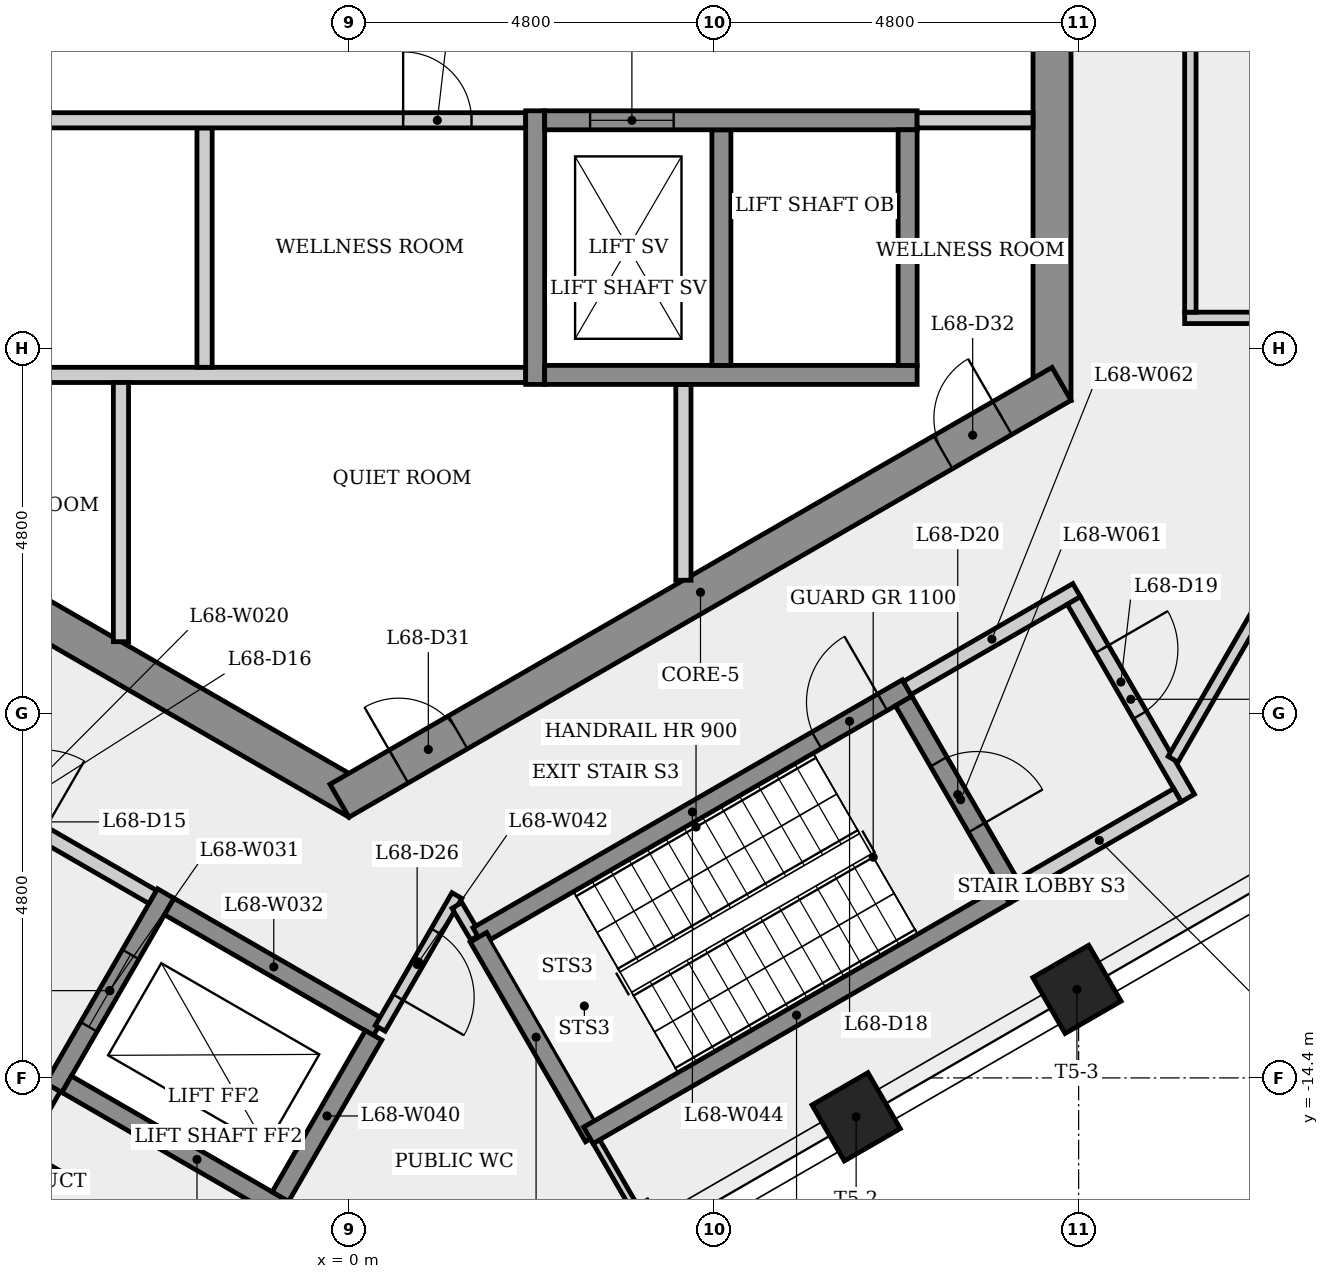
"""IFC4 building model, lengths in metres.
Left out: names, types, materials, properties, quantities, classifications, styles, units other than length and angle.
Written with IfcOpenShell. Run it as: python <this file> out.ifc"""

import sys

from ifc_helpers import new_model, si_unit, direction, frame, frame_2d, origin, origin_2d, place, context, subcontext, project, spatial, rectangle, extrude, element, fill, save


model = new_model("IFC4")
c1 = context("Model", 3, precision=1e-05, world=origin(), true_north=direction((0.0, 1.0)))
c2 = subcontext(c1, "Body", "Model", "MODEL_VIEW")
j1 = project(units=[si_unit("LENGTHUNIT", "METRE"), si_unit("PLANEANGLEUNIT", "RADIAN")], contexts=[c1])
p1 = place(None, origin())
s1 = spatial("IfcSite", under=j1, at=p1, CompositionType="ELEMENT")
p2 = place(p1, origin())
s2 = spatial("IfcBuilding", under=s1, at=p2, CompositionType="ELEMENT")
p3 = place(p2, frame((0.0, 0.0, 252.9)))
s3 = spatial("IfcBuildingStorey", under=s2, at=p3, CompositionType="ELEMENT", Elevation=252.9)
p4 = place(p3, frame((9.25, -5.485, 0.0), z_axis=(0.0, 0.0, 1.0), x_axis=(0.0, 1.0, 0.0)))
e1 = element("IfcWall", 1, at=p4, inside=s3, PredefinedType="SHEAR", context=c2, shape_type="SweptSolid", body=[
    extrude(rectangle(XDim=10.97, YDim=0.5, at=frame_2d((5.485, 0.0))), origin(), (0.0, 0.0, 1.0), 5.0),
])
p5 = place(p4, frame((4.685, 0.0, 0.0)))
e2 = element("IfcOpeningElement", 2, at=p5, cuts=e1, PredefinedType="OPENING", context=c2, shape_type="SweptSolid", body=[
    extrude(rectangle(XDim=1.6, YDim=2.1, at=frame_2d((0.8, 1.05))), frame((0.0, 0.26, 0.0), z_axis=(0.0, -1.0, 0.0), x_axis=(1.0, 0.0, 0.0)), (0.0, 0.0, 1.0), 0.52),
])
p6 = place(p3, frame((-9.375, -5.268, 0.0), z_axis=(0.0, 0.0, 1.0), x_axis=(0.866023993627, -0.500002442456, 0.0)))
e3 = element("IfcWall", 3, at=p6, inside=s3, PredefinedType="SHEAR", context=c2, shape_type="SweptSolid", body=[
    extrude(rectangle(XDim=10.97, YDim=0.5, at=frame_2d((5.485, 0.0))), origin(), (0.0, 0.0, 1.0), 5.0),
])
p7 = place(p6, frame((3.303, 0.0, 0.0)))
e4 = element("IfcOpeningElement", 4, at=p7, cuts=e3, PredefinedType="OPENING", context=c2, shape_type="SweptSolid", body=[
    extrude(rectangle(XDim=0.9, YDim=2.1, at=frame_2d((0.45, 1.05))), frame((0.0, 0.26, 0.0), z_axis=(0.0, -1.0, 0.0), x_axis=(1.0, 0.0, 0.0)), (0.0, 0.0, 1.0), 0.52),
])
p8 = place(p3, frame((-0.125, -10.753, 0.0), z_axis=(0.0, 0.0, 1.0), x_axis=(0.866023993627, 0.500002442456, 0.0)))
e5 = element("IfcWall", 5, at=p8, inside=s3, PredefinedType="SHEAR", context=c2, shape_type="SweptSolid", body=[
    extrude(rectangle(XDim=10.97, YDim=0.5, at=frame_2d((5.485, 0.0))), origin(), (0.0, 0.0, 1.0), 5.0),
])
p9 = place(p8, frame((0.9, 0.0, 0.0)))
e6 = element("IfcOpeningElement", 6, at=p9, cuts=e5, PredefinedType="OPENING", context=c2, shape_type="SweptSolid", body=[
    extrude(rectangle(XDim=0.9, YDim=2.1, at=frame_2d((0.45, 1.05))), frame((0.0, 0.26, 0.0), z_axis=(0.0, -1.0, 0.0), x_axis=(1.0, 0.0, 0.0)), (0.0, 0.0, 1.0), 0.52),
])
p10 = place(p8, frame((9.17, 0.0, 0.0)))
e7 = element("IfcOpeningElement", 7, at=p10, cuts=e5, PredefinedType="OPENING", context=c2, shape_type="SweptSolid", body=[
    extrude(rectangle(XDim=0.9, YDim=2.1, at=frame_2d((0.45, 1.05))), frame((0.0, 0.26, 0.0), z_axis=(0.0, -1.0, 0.0), x_axis=(1.0, 0.0, 0.0)), (0.0, 0.0, 1.0), 0.52),
])
for number, where, z_axis, x_axis in (
    (8, (6.673, -14.912, 0.0), (0.0, 0.0, 1.0), (0.5, -0.866, 0.0)),
    (9, (9.578, -13.235, 0.0), (0.0, 0.0, 1.0), (0.5, -0.866, 0.0)),
):
    element("IfcColumn", number, at=place(p3, frame(where, z_axis=z_axis, x_axis=x_axis)), inside=s3, PredefinedType="COLUMN", context=c2, shape_type="SweptSolid", body=[
        extrude(rectangle(XDim=0.85, YDim=0.85, at=origin_2d()), origin(), (0.0, 0.0, 1.0), 5.0),
    ])
p11 = place(p3, frame((-9.0, -5.15, 0.0), z_axis=(0.0, 0.0, 1.0), x_axis=(1.0, 0.0, 0.0)))
e10 = element("IfcWall", 10, at=p11, inside=s3, PredefinedType="PARTITIONING", context=c2, shape_type="SweptSolid", body=[
    extrude(rectangle(XDim=11.325, YDim=0.2, at=frame_2d((5.663, 0.0))), origin(), (0.0, 0.0, 1.0), 4.6),
])
p12 = place(p3, frame((-6.435, -9.795, 0.0), z_axis=(0.0, 0.0, 1.0), x_axis=(0.866012907634, -0.500021643343, 0.0)))
e11 = element("IfcWall", 11, at=p12, inside=s3, PredefinedType="PARTITIONING", context=c2, shape_type="SweptSolid", body=[
    extrude(rectangle(XDim=4.45, YDim=0.2, at=frame_2d((2.225, 0.0))), origin(), (0.0, 0.0, 1.0), 4.6),
])
p13 = place(p12, frame((1.675, 0.0, 0.0)))
e12 = element("IfcOpeningElement", 12, at=p13, cuts=e11, PredefinedType="OPENING", context=c2, shape_type="SweptSolid", body=[
    extrude(rectangle(XDim=1.1, YDim=2.1, at=frame_2d((0.55, 1.05))), frame((0.0, 0.11, 0.0), z_axis=(0.0, -1.0, 0.0), x_axis=(1.0, 0.0, 0.0)), (0.0, 0.0, 1.0), 0.22),
])
p14 = place(p3, frame((-4.387, -15.399, 0.0), z_axis=(0.0, 0.0, 1.0), x_axis=(0.865955154139, -0.50012165622, 0.0)))
e13 = element("IfcWall", 13, at=p14, inside=s3, PredefinedType="PLUMBINGWALL", context=c2, shape_type="SweptSolid", body=[
    extrude(rectangle(XDim=0.6, YDim=0.2, at=frame_2d((0.3, 0.0))), origin(), (0.0, 0.0, 1.0), 4.6),
])
p15 = place(p3, frame((-3.885, -14.529, 0.0), z_axis=(0.0, 0.0, 1.0), x_axis=(-0.49998975084, -0.866031321059, 0.0)))
e14 = element("IfcWall", 14, at=p15, inside=s3, PredefinedType="PARTITIONING", context=c2, shape_type="SweptSolid", body=[
    extrude(rectangle(XDim=0.975, YDim=0.2, at=frame_2d((0.488, 0.0))), origin(), (0.0, 0.0, 1.0), 4.6),
])
p16 = place(p3, frame((-3.0, -5.25, 0.0), z_axis=(0.0, 0.0, 1.0), x_axis=(0.0, -1.0, 0.0)))
e15 = element("IfcWall", 15, at=p16, inside=s3, PredefinedType="PARTITIONING", context=c2, shape_type="SweptSolid", body=[
    extrude(rectangle(XDim=3.41, YDim=0.2, at=frame_2d((1.705, 0.0))), origin(), (0.0, 0.0, 1.0), 4.6),
])
p17 = place(p3, frame((-2.41, -11.974, 0.0), z_axis=(0.0, 0.0, 1.0), x_axis=(-0.500001826776, -0.866024349092, 0.0)))
e16 = element("IfcWall", 16, at=p17, inside=s3, PredefinedType="SHEAR", context=c2, shape_type="SweptSolid", body=[
    extrude(rectangle(XDim=2.95, YDim=0.25, at=frame_2d((1.475, 0.0))), origin(), (0.0, 0.0, 1.0), 4.6),
])
p18 = place(p17, frame((0.925, 0.0, 0.0)))
e17 = element("IfcOpeningElement", 17, at=p18, cuts=e16, PredefinedType="OPENING", context=c2, shape_type="SweptSolid", body=[
    extrude(rectangle(XDim=1.1, YDim=2.1, at=frame_2d((0.55, 1.05))), frame((0.0, 0.135, 0.0), z_axis=(0.0, -1.0, 0.0), x_axis=(1.0, 0.0, 0.0)), (0.0, 0.0, 1.0), 0.27),
])
p19 = place(p3, frame((-2.364, -12.145, 0.0), z_axis=(0.0, 0.0, 1.0), x_axis=(0.866048579423, -0.499959856469, 0.0)))
e18 = element("IfcWall", 18, at=p19, inside=s3, PredefinedType="SHEAR", context=c2, shape_type="SweptSolid", body=[
    extrude(rectangle(XDim=3.175, YDim=0.25, at=frame_2d((1.587, 0.0))), origin(), (0.0, 0.0, 1.0), 5.0),
])
p20 = place(p3, frame((-1.9, -1.9, 0.0), z_axis=(0.0, 0.0, 1.0), x_axis=(0.0, -1.0, 0.0)))
e19 = element("IfcWall", 19, at=p20, inside=s3, PredefinedType="PARTITIONING", context=c2, shape_type="SweptSolid", body=[
    extrude(rectangle(XDim=3.15, YDim=0.2, at=frame_2d((1.575, 0.0))), origin(), (0.0, 0.0, 1.0), 4.6),
])
p21 = place(p3, frame((-9.0, -1.8, 0.0), z_axis=(0.0, 0.0, 1.0), x_axis=(1.0, 0.0, 0.0)))
e20 = element("IfcWall", 20, at=p21, inside=s3, PredefinedType="PARTITIONING", context=c2, shape_type="SweptSolid", body=[
    extrude(rectangle(XDim=11.325, YDim=0.2, at=frame_2d((5.663, 0.0))), origin(), (0.0, 0.0, 1.0), 4.6),
])
p22 = place(p21, frame((3.085, 0.0, 0.0)))
e21 = element("IfcOpeningElement", 21, at=p22, cuts=e20, PredefinedType="OPENING", context=c2, shape_type="SweptSolid", body=[
    extrude(rectangle(XDim=0.9, YDim=2.1, at=frame_2d((0.45, 1.05))), frame((0.0, 0.11, 0.0), z_axis=(0.0, -1.0, 0.0), x_axis=(1.0, 0.0, 0.0)), (0.0, 0.0, 1.0), 0.22),
])
p23 = place(p21, frame((9.713, 0.0, 0.0)))
e22 = element("IfcOpeningElement", 22, at=p23, cuts=e20, PredefinedType="OPENING", context=c2, shape_type="SweptSolid", body=[
    extrude(rectangle(XDim=0.9, YDim=2.1, at=frame_2d((0.45, 1.05))), frame((0.0, 0.11, 0.0), z_axis=(0.0, -1.0, 0.0), x_axis=(1.0, 0.0, 0.0)), (0.0, 0.0, 1.0), 0.22),
])
p24 = place(p3, frame((-0.856, -16.133, 0.0), z_axis=(0.0, 0.0, 1.0), x_axis=(-0.866021716278, 0.500006386895, 0.0)))
e23 = element("IfcWall", 23, at=p24, inside=s3, PredefinedType="SHEAR", context=c2, shape_type="SweptSolid", body=[
    extrude(rectangle(XDim=3.3, YDim=0.25, at=frame_2d((1.65, 0.0))), origin(), (0.0, 0.0, 1.0), 4.6),
])
p25 = place(p3, frame((0.324, -13.839, 0.0), z_axis=(0.0, 0.0, 1.0), x_axis=(-0.500015484165, -0.866016463813, 0.0)))
e24 = element("IfcWall", 24, at=p25, inside=s3, PredefinedType="SHEAR", context=c2, shape_type="SweptSolid", body=[
    extrude(rectangle(XDim=2.452, YDim=0.25, at=frame_2d((1.226, 0.0))), origin(), (0.0, 0.0, 1.0), 5.0),
])
p26 = place(p3, frame((1.42, -12.0, 0.0), z_axis=(0.0, 0.0, 1.0), x_axis=(-0.499952933402, -0.866052575992, 0.0)))
e25 = element("IfcWall", 25, at=p26, inside=s3, PredefinedType="PARTITIONING", context=c2, shape_type="SweptSolid", body=[
    extrude(rectangle(XDim=2.017, YDim=0.15, at=frame_2d((1.009, 0.0))), origin(), (0.0, 0.0, 1.0), 4.6),
])
p27 = place(p26, frame((0.546, 0.0, 0.0)))
e26 = element("IfcOpeningElement", 26, at=p27, cuts=e25, PredefinedType="OPENING", context=c2, shape_type="SweptSolid", body=[
    extrude(rectangle(XDim=1.0, YDim=2.1, at=frame_2d((0.5, 1.05))), frame((0.0, 0.085, 0.0), z_axis=(0.0, -1.0, 0.0), x_axis=(1.0, 0.0, 0.0)), (0.0, 0.0, 1.0), 0.17),
])
p28 = place(p3, frame((1.667, -12.548, 0.0), z_axis=(0.0, 0.0, 1.0), x_axis=(-0.508186221736, 0.861247214241, 0.0)))
e27 = element("IfcWall", 27, at=p28, inside=s3, PredefinedType="PARTITIONING", context=c2, shape_type="SweptSolid", body=[
    extrude(rectangle(XDim=0.485, YDim=0.15, at=frame_2d((0.242, 0.0))), origin(), (0.0, 0.0, 1.0), 4.6),
])
p29 = place(p3, frame((1.693, -12.532, 0.0), z_axis=(0.0, 0.0, 1.0), x_axis=(0.866031063448, 0.499990197047, 0.0)))
e28 = element("IfcWall", 28, at=p29, inside=s3, PredefinedType="SHEAR", context=c2, shape_type="SweptSolid", body=[
    extrude(rectangle(XDim=6.525, YDim=0.25, at=frame_2d((3.263, 0.0))), origin(), (0.0, 0.0, 1.0), 4.6),
])
p30 = place(p29, frame((5.15, 0.0, 0.0)))
e29 = element("IfcOpeningElement", 29, at=p30, cuts=e28, PredefinedType="OPENING", context=c2, shape_type="SweptSolid", body=[
    extrude(rectangle(XDim=1.0, YDim=2.1, at=frame_2d((0.5, 1.05))), frame((0.0, 0.135, 0.0), z_axis=(0.0, -1.0, 0.0), x_axis=(1.0, 0.0, 0.0)), (0.0, 0.0, 1.0), 0.27),
])
p31 = place(p3, frame((2.45, -5.275, 0.0), z_axis=(0.0, 0.0, 1.0), x_axis=(0.0, 1.0, 0.0)))
e30 = element("IfcWall", 30, at=p31, inside=s3, PredefinedType="SHEAR", context=c2, shape_type="SweptSolid", body=[
    extrude(rectangle(XDim=3.6, YDim=0.25, at=frame_2d((1.8, 0.0))), origin(), (0.0, 0.0, 1.0), 4.6),
])
p32 = place(p3, frame((3.221, -15.178, 0.0), z_axis=(0.0, 0.0, 1.0), x_axis=(-0.500014901547, 0.866016800201, 0.0)))
e31 = element("IfcWall", 31, at=p32, inside=s3, PredefinedType="SHEAR", context=c2, shape_type="SweptSolid", body=[
    extrude(rectangle(XDim=3.035, YDim=0.25, at=frame_2d((1.518, 0.0))), origin(), (0.0, 0.0, 1.0), 4.6),
])
p33 = place(p3, frame((3.99, -16.511, 0.0), z_axis=(0.0, 0.0, 1.0), x_axis=(-0.499928667132, 0.866066583918, 0.0)))
e32 = element("IfcWall", 32, at=p33, inside=s3, PredefinedType="PARTITIONING", context=c2, shape_type="SweptSolid", body=[
    extrude(rectangle(XDim=1.469, YDim=0.1, at=frame_2d((0.734, 0.0))), origin(), (0.0, 0.0, 1.0), 4.6),
])
p34 = place(p3, frame((4.4, -5.275, 0.0), z_axis=(0.0, 0.0, 1.0), x_axis=(0.0, -1.0, 0.0)))
e33 = element("IfcWall", 33, at=p34, inside=s3, PredefinedType="PARTITIONING", context=c2, shape_type="SweptSolid", body=[
    extrude(rectangle(XDim=2.577, YDim=0.2, at=frame_2d((1.289, 0.0))), origin(), (0.0, 0.0, 1.0), 4.6),
])
p35 = place(p3, frame((2.575, -5.15, 0.0), z_axis=(0.0, 0.0, 1.0), x_axis=(1.0, 0.0, 0.0)))
e34 = element("IfcWall", 34, at=p35, inside=s3, PredefinedType="SHEAR", context=c2, shape_type="SweptSolid", body=[
    extrude(rectangle(XDim=4.9, YDim=0.25, at=frame_2d((2.45, 0.0))), origin(), (0.0, 0.0, 1.0), 4.6),
])
p36 = place(p3, frame((4.9, -1.925, 0.0), z_axis=(0.0, 0.0, 1.0), x_axis=(0.0, -1.0, 0.0)))
e35 = element("IfcWall", 35, at=p36, inside=s3, PredefinedType="SHEAR", context=c2, shape_type="SweptSolid", body=[
    extrude(rectangle(XDim=3.1, YDim=0.25, at=frame_2d((1.55, 0.0))), origin(), (0.0, 0.0, 1.0), 5.0),
])
p37 = place(p3, frame((2.575, -1.8, 0.0), z_axis=(0.0, 0.0, 1.0), x_axis=(1.0, 0.0, 0.0)))
e36 = element("IfcWall", 36, at=p37, inside=s3, PredefinedType="SHEAR", context=c2, shape_type="SweptSolid", body=[
    extrude(rectangle(XDim=4.9, YDim=0.25, at=frame_2d((2.45, 0.0))), origin(), (0.0, 0.0, 1.0), 4.6),
])
p38 = place(p37, frame((0.597, 0.0, 0.0)))
e37 = element("IfcOpeningElement", 37, at=p38, cuts=e36, PredefinedType="OPENING", context=c2, shape_type="SweptSolid", body=[
    extrude(rectangle(XDim=1.1, YDim=2.1, at=frame_2d((0.55, 1.05))), frame((0.0, 0.135, 0.0), z_axis=(0.0, -1.0, 0.0), x_axis=(1.0, 0.0, 0.0)), (0.0, 0.0, 1.0), 0.27),
])
p39 = place(p3, frame((7.298, -9.441, 0.0), z_axis=(0.0, 0.0, 1.0), x_axis=(0.50002537861, -0.866010750942, 0.0)))
e38 = element("IfcWall", 38, at=p39, inside=s3, PredefinedType="SHEAR", context=c2, shape_type="SweptSolid", body=[
    extrude(rectangle(XDim=3.0, YDim=0.25, at=frame_2d((1.5, 0.0))), origin(), (0.0, 0.0, 1.0), 4.6),
])
p40 = place(p39, frame((0.923, 0.0, 0.0)))
e39 = element("IfcOpeningElement", 39, at=p40, cuts=e38, PredefinedType="OPENING", context=c2, shape_type="SweptSolid", body=[
    extrude(rectangle(XDim=1.0, YDim=2.1, at=frame_2d((0.5, 1.05))), frame((0.0, 0.135, 0.0), z_axis=(0.0, -1.0, 0.0), x_axis=(1.0, 0.0, 0.0)), (0.0, 0.0, 1.0), 0.27),
])
p41 = place(p3, frame((7.344, -9.27, 0.0), z_axis=(0.0, 0.0, 1.0), x_axis=(0.866005588531, 0.500034319456, 0.0)))
e40 = element("IfcWall", 40, at=p41, inside=s3, PredefinedType="PARTITIONING", context=c2, shape_type="SweptSolid", body=[
    extrude(rectangle(XDim=2.575, YDim=0.2, at=frame_2d((1.288, 0.0))), origin(), (0.0, 0.0, 1.0), 4.6),
])
p42 = place(p3, frame((7.35, -1.925, 0.0), z_axis=(0.0, 0.0, 1.0), x_axis=(0.0, -1.0, 0.0)))
e41 = element("IfcWall", 41, at=p42, inside=s3, PredefinedType="SHEAR", context=c2, shape_type="SweptSolid", body=[
    extrude(rectangle(XDim=3.1, YDim=0.25, at=frame_2d((1.55, 0.0))), origin(), (0.0, 0.0, 1.0), 5.0),
])
p43 = place(p3, frame((8.627, -11.993, 0.0), z_axis=(0.0, 0.0, 1.0), x_axis=(-0.866032601554, -0.49998753289, 0.0)))
e42 = element("IfcWall", 42, at=p43, inside=s3, PredefinedType="SHEAR", context=c2, shape_type="SweptSolid", body=[
    extrude(rectangle(XDim=6.325, YDim=0.25, at=frame_2d((3.163, 0.0))), origin(), (0.0, 0.0, 1.0), 4.6),
])
p44 = place(p3, frame((9.0, -1.8, 0.0), z_axis=(0.0, 0.0, 1.0), x_axis=(-1.0, 0.0, 0.0)))
e43 = element("IfcWall", 43, at=p44, inside=s3, PredefinedType="PARTITIONING", context=c2, shape_type="SweptSolid", body=[
    extrude(rectangle(XDim=1.525, YDim=0.2, at=frame_2d((0.763, 0.0))), origin(), (0.0, 0.0, 1.0), 4.6),
])
p45 = place(p3, frame((9.537, -8.119, 0.0), z_axis=(0.0, 0.0, 1.0), x_axis=(0.499990139034, -0.866031096941, 0.0)))
e44 = element("IfcWall", 44, at=p45, inside=s3, PredefinedType="PARTITIONING", context=c2, shape_type="SweptSolid", body=[
    extrude(rectangle(XDim=3.0, YDim=0.2, at=frame_2d((1.5, 0.0))), origin(), (0.0, 0.0, 1.0), 4.6),
])
p46 = place(p45, frame((0.738, 0.0, 0.0)))
e45 = element("IfcOpeningElement", 45, at=p46, cuts=e44, PredefinedType="OPENING", context=c2, shape_type="SweptSolid", body=[
    extrude(rectangle(XDim=1.0, YDim=2.1, at=frame_2d((0.5, 1.05))), frame((0.0, 0.11, 0.0), z_axis=(0.0, -1.0, 0.0), x_axis=(1.0, 0.0, 0.0)), (0.0, 0.0, 1.0), 0.22),
])
p47 = place(p3, frame((10.901, -10.681, 0.0), z_axis=(0.0, 0.0, 1.0), x_axis=(-0.866007538022, -0.500030943131, 0.0)))
e46 = element("IfcWall", 46, at=p47, inside=s3, PredefinedType="PARTITIONING", context=c2, shape_type="SweptSolid", body=[
    extrude(rectangle(XDim=2.375, YDim=0.2, at=frame_2d((1.188, 0.0))), origin(), (0.0, 0.0, 1.0), 4.6),
])
p48 = place(p3, frame((10.995, -4.4, 0.0), z_axis=(0.0, 0.0, 1.0), x_axis=(1.0, 0.0, 0.0)))
e47 = element("IfcWall", 47, at=p48, inside=s3, PredefinedType="PARTITIONING", context=c2, shape_type="SweptSolid", body=[
    extrude(rectangle(XDim=3.275, YDim=0.15, at=frame_2d((1.638, 0.0))), origin(), (0.0, 0.0, 1.0), 4.6),
])
p49 = place(p3, frame((11.07, 4.475, 0.0), z_axis=(0.0, 0.0, 1.0), x_axis=(0.0, -1.0, 0.0)))
e48 = element("IfcWall", 48, at=p49, inside=s3, PredefinedType="PARTITIONING", context=c2, shape_type="SweptSolid", body=[
    extrude(rectangle(XDim=8.799, YDim=0.15, at=frame_2d((4.4, 0.0))), origin(), (0.0, 0.0, 1.0), 4.6),
])
p50 = place(p49, frame((3.937, 0.0, 0.0)))
e49 = element("IfcOpeningElement", 49, at=p50, cuts=e48, PredefinedType="OPENING", context=c2, shape_type="SweptSolid", body=[
    extrude(rectangle(XDim=1.0, YDim=2.1, at=frame_2d((0.5, 1.05))), frame((0.0, 0.085, 0.0), z_axis=(0.0, -1.0, 0.0), x_axis=(1.0, 0.0, 0.0)), (0.0, 0.0, 1.0), 0.17),
])
p51 = place(p3, frame((14.158, -4.465, 0.0), z_axis=(0.0, 0.0, 1.0), x_axis=(-0.499992313652, -0.866029841454, 0.0)))
e50 = element("IfcWall", 50, at=p51, inside=s3, PredefinedType="PARTITIONING", context=c2, shape_type="SweptSolid", body=[
    extrude(rectangle(XDim=6.63, YDim=0.15, at=frame_2d((3.315, 0.0))), origin(), (0.0, 0.0, 1.0), 4.6),
])
p52 = place(p38, origin())
e51 = element("IfcDoor", 51, at=p52, inside=s3, OperationType="SLIDING_TO_LEFT", PredefinedType="DOOR", context=c2, shape_type="SweptSolid", body=[
    extrude(rectangle(XDim=1.1, YDim=2.1, at=frame_2d((0.55, 1.05))), frame((0.0, 0.025, 0.0), z_axis=(0.0, -1.0, 0.0), x_axis=(1.0, 0.0, 0.0)), (0.0, 0.0, 1.0), 0.05),
])
fill(e37, e51)
p53 = place(p23, origin())
e52 = element("IfcDoor", 52, at=p53, inside=s3, OperationType="SINGLE_SWING_LEFT", PredefinedType="DOOR", context=c2, shape_type="SweptSolid", body=[
    extrude(rectangle(XDim=0.9, YDim=2.1, at=frame_2d((0.45, 1.05))), frame((0.0, 0.025, 0.0), z_axis=(0.0, -1.0, 0.0), x_axis=(1.0, 0.0, 0.0)), (0.0, 0.0, 1.0), 0.05),
])
fill(e22, e52)
p54 = place(p18, origin())
e53 = element("IfcDoor", 53, at=p54, inside=s3, OperationType="SLIDING_TO_LEFT", PredefinedType="DOOR", context=c2, shape_type="SweptSolid", body=[
    extrude(rectangle(XDim=1.1, YDim=2.1, at=frame_2d((0.55, 1.05))), frame((0.0, 0.025, 0.0), z_axis=(0.0, -1.0, 0.0), x_axis=(1.0, 0.0, 0.0)), (0.0, 0.0, 1.0), 0.05),
])
fill(e17, e53)
p55 = place(p30, origin())
e54 = element("IfcDoor", 54, at=p55, inside=s3, OperationType="SINGLE_SWING_RIGHT", PredefinedType="DOOR", context=c2, shape_type="SweptSolid", body=[
    extrude(rectangle(XDim=1.0, YDim=2.1, at=frame_2d((0.5, 1.05))), frame((0.0, 0.025, 0.0), z_axis=(0.0, -1.0, 0.0), x_axis=(1.0, 0.0, 0.0)), (0.0, 0.0, 1.0), 0.05),
])
fill(e29, e54)
p56 = place(p46, origin())
e55 = element("IfcDoor", 55, at=p56, inside=s3, OperationType="SINGLE_SWING_LEFT", PredefinedType="DOOR", context=c2, shape_type="SweptSolid", body=[
    extrude(rectangle(XDim=1.0, YDim=2.1, at=frame_2d((0.5, 1.05))), frame((0.0, 0.025, 0.0), z_axis=(0.0, -1.0, 0.0), x_axis=(1.0, 0.0, 0.0)), (0.0, 0.0, 1.0), 0.05),
])
fill(e45, e55)
p57 = place(p40, origin())
e56 = element("IfcDoor", 56, at=p57, inside=s3, OperationType="SINGLE_SWING_RIGHT", PredefinedType="DOOR", context=c2, shape_type="SweptSolid", body=[
    extrude(rectangle(XDim=1.0, YDim=2.1, at=frame_2d((0.5, 1.05))), frame((0.0, 0.025, 0.0), z_axis=(0.0, -1.0, 0.0), x_axis=(1.0, 0.0, 0.0)), (0.0, 0.0, 1.0), 0.05),
])
fill(e39, e56)
p58 = place(p27, origin())
e57 = element("IfcDoor", 57, at=p58, inside=s3, OperationType="SINGLE_SWING_RIGHT", PredefinedType="DOOR", context=c2, shape_type="SweptSolid", body=[
    extrude(rectangle(XDim=1.0, YDim=2.1, at=frame_2d((0.5, 1.05))), frame((0.0, 0.025, 0.0), z_axis=(0.0, -1.0, 0.0), x_axis=(1.0, 0.0, 0.0)), (0.0, 0.0, 1.0), 0.05),
])
fill(e26, e57)
p59 = place(p9, origin())
e58 = element("IfcDoor", 58, at=p59, inside=s3, OperationType="SINGLE_SWING_LEFT", PredefinedType="DOOR", context=c2, shape_type="SweptSolid", body=[
    extrude(rectangle(XDim=0.9, YDim=2.1, at=frame_2d((0.45, 1.05))), frame((0.0, 0.025, 0.0), z_axis=(0.0, -1.0, 0.0), x_axis=(1.0, 0.0, 0.0)), (0.0, 0.0, 1.0), 0.05),
])
fill(e6, e58)
p60 = place(p10, origin())
e59 = element("IfcDoor", 59, at=p60, inside=s3, OperationType="SINGLE_SWING_RIGHT", PredefinedType="DOOR", context=c2, shape_type="SweptSolid", body=[
    extrude(rectangle(XDim=0.9, YDim=2.1, at=frame_2d((0.45, 1.05))), frame((0.0, 0.025, 0.0), z_axis=(0.0, -1.0, 0.0), x_axis=(1.0, 0.0, 0.0)), (0.0, 0.0, 1.0), 0.05),
])
fill(e7, e59)
save(model, sys.argv[1])
